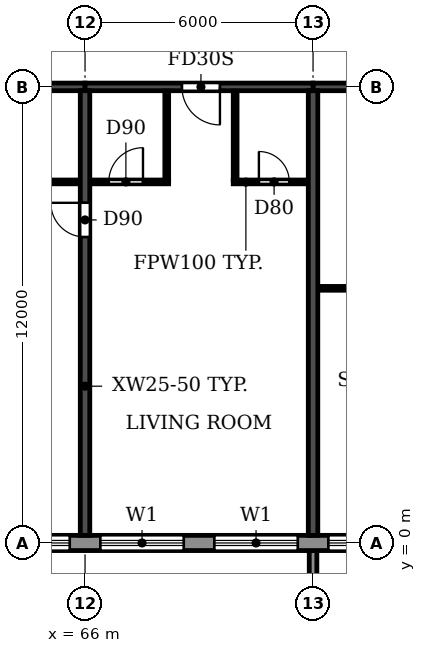
"""IFC4 building model, lengths in metres.
Left out: names, types, materials, properties, quantities, classifications, styles, units other than length and angle.
Written with IfcOpenShell. Run it as: python <this file> out.ifc"""

import sys

from ifc_helpers import new_model, si_unit, direction, frame, frame_2d, origin, place, context, subcontext, project, spatial, polyline, rectangle, outline, extrude, source, transform, mapped, element, fill, save


model = new_model("IFC4")
c1 = context("Model", 3, precision=1e-05, world=origin(), true_north=direction((0.0, 1.0)))
c2 = subcontext(c1, "Body", "Model", "MODEL_VIEW")
j1 = project(units=[si_unit("LENGTHUNIT", "METRE"), si_unit("PLANEANGLEUNIT", "RADIAN")], contexts=[c1])
p1 = place(None, origin())
s1 = spatial("IfcSite", under=j1, at=p1, CompositionType="ELEMENT")
p2 = place(p1, origin())
s2 = spatial("IfcBuilding", under=s1, at=p2, CompositionType="ELEMENT")
p3 = place(p2, frame((0.0, 0.0, 208.2)))
s3 = spatial("IfcBuildingStorey", under=s2, at=p3, CompositionType="ELEMENT", Elevation=208.2)
p4 = place(p3, frame((66.0, 0.2, 0.0), z_axis=(0.0, 0.0, 1.0), x_axis=(0.0, 1.0, 0.0)))
e1 = element("IfcWall", 1, at=p4, inside=s3, PredefinedType="SHEAR", context=c2, shape_type="SweptSolid", body=[
    extrude(rectangle(XDim=11.7, YDim=0.25, at=frame_2d((5.85, 0.0))), origin(), (0.0, 0.0, 1.0), 3.0),
])
p5 = place(p4, frame((7.85, 0.0, 0.0)))
e2 = element("IfcOpeningElement", 2, at=p5, cuts=e1, PredefinedType="OPENING", context=c2, shape_type="SweptSolid", body=[
    extrude(rectangle(XDim=0.9, YDim=2.1, at=frame_2d((0.45, 1.05))), frame((0.0, 0.135, 0.0), z_axis=(0.0, -1.0, 0.0), x_axis=(1.0, 0.0, 0.0)), (0.0, 0.0, 1.0), 0.27),
])
p6 = place(p3, frame((72.0, 0.2, 0.0), z_axis=(0.0, 0.0, 1.0), x_axis=(0.0, 1.0, 0.0)))
e3 = element("IfcWall", 3, at=p6, inside=s3, PredefinedType="SHEAR", context=c2, shape_type="SweptSolid", body=[
    extrude(rectangle(XDim=11.7, YDim=0.25, at=frame_2d((5.85, 0.0))), origin(), (0.0, 0.0, 1.0), 3.0),
])
p7 = place(p3, frame((60.0, 12.0, 0.0), z_axis=(0.0, 0.0, 1.0), x_axis=(1.0, 0.0, 0.0)))
e4 = element("IfcWall", 4, at=p7, inside=s3, PredefinedType="SHEAR", context=c2, shape_type="SweptSolid", body=[
    extrude(rectangle(XDim=6.0, YDim=0.2, at=frame_2d((3.0, 0.0))), origin(), (0.0, 0.0, 1.0), 2.4),
])
p8 = place(p3, frame((66.0, 12.0, 0.0), z_axis=(0.0, 0.0, 1.0), x_axis=(1.0, 0.0, 0.0)))
e5 = element("IfcWall", 5, at=p8, inside=s3, PredefinedType="SHEAR", context=c2, shape_type="SweptSolid", body=[
    extrude(rectangle(XDim=6.0, YDim=0.2, at=frame_2d((3.0, 0.0))), origin(), (0.0, 0.0, 1.0), 2.4),
])
p9 = place(p8, frame((2.55, 0.0, 0.0)))
e6 = element("IfcOpeningElement", 6, at=p9, cuts=e5, PredefinedType="OPENING", context=c2, shape_type="SweptSolid", body=[
    extrude(rectangle(XDim=1.0, YDim=2.1, at=frame_2d((0.5, 1.05))), frame((0.0, 0.11, 0.0), z_axis=(0.0, -1.0, 0.0), x_axis=(1.0, 0.0, 0.0)), (0.0, 0.0, 1.0), 0.22),
])
p10 = place(p3, frame((72.0, 12.0, 0.0), z_axis=(0.0, 0.0, 1.0), x_axis=(1.0, 0.0, 0.0)))
e7 = element("IfcWall", 7, at=p10, inside=s3, PredefinedType="SHEAR", context=c2, shape_type="SweptSolid", body=[
    extrude(rectangle(XDim=6.0, YDim=0.2, at=frame_2d((3.0, 0.0))), origin(), (0.0, 0.0, 1.0), 2.4),
])
p11 = place(p10, frame((2.55, 0.0, 0.0)))
e8 = element("IfcOpeningElement", 8, at=p11, cuts=e7, PredefinedType="OPENING", context=c2, shape_type="SweptSolid", body=[
    extrude(rectangle(XDim=1.0, YDim=2.1, at=frame_2d((0.5, 1.05))), frame((0.0, 0.11, 0.0), z_axis=(0.0, -1.0, 0.0), x_axis=(1.0, 0.0, 0.0)), (0.0, 0.0, 1.0), 0.22),
])
p12 = place(p3, frame((22.683, 0.0, 0.0), z_axis=(0.0, 0.0, 1.0), x_axis=(1.0, 0.0, 0.0)))
e9 = element("IfcWall", 9, at=p12, inside=s3, PredefinedType="STANDARD", context=c2, shape_type="SweptSolid", body=[
    extrude(rectangle(XDim=56.634, YDim=0.4, at=frame_2d((28.317, 0.0))), origin(), (0.0, 0.0, 1.0), 3.0),
])
p13 = place(p12, frame((1.917, 0.0, 0.0)))
e10 = element("IfcOpeningElement", 10, at=p13, cuts=e9, PredefinedType="OPENING", context=c2, shape_type="SweptSolid", body=[
    extrude(rectangle(XDim=1.8, YDim=2.4, at=frame_2d((0.9, 1.2))), frame((0.0, 0.21, 0.0), z_axis=(0.0, -1.0, 0.0), x_axis=(1.0, 0.0, 0.0)), (0.0, 0.0, 1.0), 0.42),
])
p14 = place(p12, frame((4.717, 0.0, 0.9)))
e11 = element("IfcOpeningElement", 11, at=p14, cuts=e9, PredefinedType="OPENING", context=c2, shape_type="SweptSolid", body=[
    extrude(rectangle(XDim=2.2, YDim=1.5, at=frame_2d((1.1, 0.75))), frame((0.0, 0.21, 0.0), z_axis=(0.0, -1.0, 0.0), x_axis=(1.0, 0.0, 0.0)), (0.0, 0.0, 1.0), 0.42),
])
p15 = place(p12, frame((7.717, 0.0, 0.9)))
e12 = element("IfcOpeningElement", 12, at=p15, cuts=e9, PredefinedType="OPENING", context=c2, shape_type="SweptSolid", body=[
    extrude(rectangle(XDim=2.2, YDim=1.5, at=frame_2d((1.1, 0.75))), frame((0.0, 0.21, 0.0), z_axis=(0.0, -1.0, 0.0), x_axis=(1.0, 0.0, 0.0)), (0.0, 0.0, 1.0), 0.42),
])
p16 = place(p12, frame((10.717, 0.0, 0.9)))
e13 = element("IfcOpeningElement", 13, at=p16, cuts=e9, PredefinedType="OPENING", context=c2, shape_type="SweptSolid", body=[
    extrude(rectangle(XDim=2.2, YDim=1.5, at=frame_2d((1.1, 0.75))), frame((0.0, 0.21, 0.0), z_axis=(0.0, -1.0, 0.0), x_axis=(1.0, 0.0, 0.0)), (0.0, 0.0, 1.0), 0.42),
])
p17 = place(p12, frame((13.917, 0.0, 0.0)))
e14 = element("IfcOpeningElement", 14, at=p17, cuts=e9, PredefinedType="OPENING", context=c2, shape_type="SweptSolid", body=[
    extrude(rectangle(XDim=1.8, YDim=2.4, at=frame_2d((0.9, 1.2))), frame((0.0, 0.21, 0.0), z_axis=(0.0, -1.0, 0.0), x_axis=(1.0, 0.0, 0.0)), (0.0, 0.0, 1.0), 0.42),
])
p18 = place(p12, frame((16.717, 0.0, 0.9)))
e15 = element("IfcOpeningElement", 15, at=p18, cuts=e9, PredefinedType="OPENING", context=c2, shape_type="SweptSolid", body=[
    extrude(rectangle(XDim=2.2, YDim=1.5, at=frame_2d((1.1, 0.75))), frame((0.0, 0.21, 0.0), z_axis=(0.0, -1.0, 0.0), x_axis=(1.0, 0.0, 0.0)), (0.0, 0.0, 1.0), 0.42),
])
p19 = place(p12, frame((19.717, 0.0, 0.9)))
e16 = element("IfcOpeningElement", 16, at=p19, cuts=e9, PredefinedType="OPENING", context=c2, shape_type="SweptSolid", body=[
    extrude(rectangle(XDim=2.2, YDim=1.5, at=frame_2d((1.1, 0.75))), frame((0.0, 0.21, 0.0), z_axis=(0.0, -1.0, 0.0), x_axis=(1.0, 0.0, 0.0)), (0.0, 0.0, 1.0), 0.42),
])
p20 = place(p12, frame((22.717, 0.0, 0.9)))
e17 = element("IfcOpeningElement", 17, at=p20, cuts=e9, PredefinedType="OPENING", context=c2, shape_type="SweptSolid", body=[
    extrude(rectangle(XDim=2.2, YDim=1.5, at=frame_2d((1.1, 0.75))), frame((0.0, 0.21, 0.0), z_axis=(0.0, -1.0, 0.0), x_axis=(1.0, 0.0, 0.0)), (0.0, 0.0, 1.0), 0.42),
])
p21 = place(p12, frame((25.917, 0.0, 0.0)))
e18 = element("IfcOpeningElement", 18, at=p21, cuts=e9, PredefinedType="OPENING", context=c2, shape_type="SweptSolid", body=[
    extrude(rectangle(XDim=1.8, YDim=2.4, at=frame_2d((0.9, 1.2))), frame((0.0, 0.21, 0.0), z_axis=(0.0, -1.0, 0.0), x_axis=(1.0, 0.0, 0.0)), (0.0, 0.0, 1.0), 0.42),
])
p22 = place(p12, frame((28.717, 0.0, 0.9)))
e19 = element("IfcOpeningElement", 19, at=p22, cuts=e9, PredefinedType="OPENING", context=c2, shape_type="SweptSolid", body=[
    extrude(rectangle(XDim=2.2, YDim=1.5, at=frame_2d((1.1, 0.75))), frame((0.0, 0.21, 0.0), z_axis=(0.0, -1.0, 0.0), x_axis=(1.0, 0.0, 0.0)), (0.0, 0.0, 1.0), 0.42),
])
p23 = place(p12, frame((31.717, 0.0, 0.9)))
e20 = element("IfcOpeningElement", 20, at=p23, cuts=e9, PredefinedType="OPENING", context=c2, shape_type="SweptSolid", body=[
    extrude(rectangle(XDim=2.2, YDim=1.5, at=frame_2d((1.1, 0.75))), frame((0.0, 0.21, 0.0), z_axis=(0.0, -1.0, 0.0), x_axis=(1.0, 0.0, 0.0)), (0.0, 0.0, 1.0), 0.42),
])
p24 = place(p12, frame((34.717, 0.0, 0.9)))
e21 = element("IfcOpeningElement", 21, at=p24, cuts=e9, PredefinedType="OPENING", context=c2, shape_type="SweptSolid", body=[
    extrude(rectangle(XDim=2.2, YDim=1.5, at=frame_2d((1.1, 0.75))), frame((0.0, 0.21, 0.0), z_axis=(0.0, -1.0, 0.0), x_axis=(1.0, 0.0, 0.0)), (0.0, 0.0, 1.0), 0.42),
])
p25 = place(p12, frame((37.717, 0.0, 0.9)))
e22 = element("IfcOpeningElement", 22, at=p25, cuts=e9, PredefinedType="OPENING", context=c2, shape_type="SweptSolid", body=[
    extrude(rectangle(XDim=2.2, YDim=1.5, at=frame_2d((1.1, 0.75))), frame((0.0, 0.21, 0.0), z_axis=(0.0, -1.0, 0.0), x_axis=(1.0, 0.0, 0.0)), (0.0, 0.0, 1.0), 0.42),
])
p26 = place(p12, frame((40.717, 0.0, 0.9)))
e23 = element("IfcOpeningElement", 23, at=p26, cuts=e9, PredefinedType="OPENING", context=c2, shape_type="SweptSolid", body=[
    extrude(rectangle(XDim=2.2, YDim=1.5, at=frame_2d((1.1, 0.75))), frame((0.0, 0.21, 0.0), z_axis=(0.0, -1.0, 0.0), x_axis=(1.0, 0.0, 0.0)), (0.0, 0.0, 1.0), 0.42),
])
p27 = place(p12, frame((43.717, 0.0, 0.9)))
e24 = element("IfcOpeningElement", 24, at=p27, cuts=e9, PredefinedType="OPENING", context=c2, shape_type="SweptSolid", body=[
    extrude(rectangle(XDim=2.2, YDim=1.5, at=frame_2d((1.1, 0.75))), frame((0.0, 0.21, 0.0), z_axis=(0.0, -1.0, 0.0), x_axis=(1.0, 0.0, 0.0)), (0.0, 0.0, 1.0), 0.42),
])
p28 = place(p12, frame((46.717, 0.0, 0.9)))
e25 = element("IfcOpeningElement", 25, at=p28, cuts=e9, PredefinedType="OPENING", context=c2, shape_type="SweptSolid", body=[
    extrude(rectangle(XDim=2.2, YDim=1.5, at=frame_2d((1.1, 0.75))), frame((0.0, 0.21, 0.0), z_axis=(0.0, -1.0, 0.0), x_axis=(1.0, 0.0, 0.0)), (0.0, 0.0, 1.0), 0.42),
])
p29 = place(p12, frame((49.717, 0.0, 0.9)))
e26 = element("IfcOpeningElement", 26, at=p29, cuts=e9, PredefinedType="OPENING", context=c2, shape_type="SweptSolid", body=[
    extrude(rectangle(XDim=2.2, YDim=1.5, at=frame_2d((1.1, 0.75))), frame((0.0, 0.21, 0.0), z_axis=(0.0, -1.0, 0.0), x_axis=(1.0, 0.0, 0.0)), (0.0, 0.0, 1.0), 0.42),
])
p30 = place(p12, frame((52.917, 0.0, 0.0)))
e27 = element("IfcOpeningElement", 27, at=p30, cuts=e9, PredefinedType="OPENING", context=c2, shape_type="SweptSolid", body=[
    extrude(rectangle(XDim=1.8, YDim=2.4, at=frame_2d((0.9, 1.2))), frame((0.0, 0.21, 0.0), z_axis=(0.0, -1.0, 0.0), x_axis=(1.0, 0.0, 0.0)), (0.0, 0.0, 1.0), 0.42),
])
m1 = source(origin(), c2, "Body", "SweptSolid", [
    extrude(outline(polyline([(0.0, 0.0), (0.2, 0.0), (0.2, 1.65), (0.0, 1.65), (0.0, 0.0)])), origin(), (0.0, 0.0, 1.0), 3.1),
])
p31 = place(p3, frame((71.9, -1.85, 0.0)))
e28 = element("IfcWall", 28, at=p31, inside=s3, PredefinedType="STANDARD", context=c2, shape_type="MappedRepresentation", body=[
    mapped(m1, transform((0.0, 0.0, 0.0))),
])
p32 = place(p3, frame((72.135, 6.7, 0.0), z_axis=(0.0, 0.0, 1.0), x_axis=(1.0, 0.0, 0.0)))
e29 = element("IfcWall", 29, at=p32, inside=s3, PredefinedType="PARTITIONING", context=c2, shape_type="SweptSolid", body=[
    extrude(rectangle(XDim=2.065, YDim=0.1, at=frame_2d((1.032, 0.0))), origin(), (0.0, 0.0, 1.0), 3.0),
])
p33 = place(p3, frame((63.1, 9.5, 0.0), z_axis=(0.0, 0.0, 1.0), x_axis=(1.0, 0.0, 0.0)))
e30 = element("IfcWall", 30, at=p33, inside=s3, PredefinedType="PARTITIONING", context=c2, shape_type="SweptSolid", body=[
    extrude(rectangle(XDim=2.765, YDim=0.1, at=frame_2d((1.382, 0.0))), origin(), (0.0, 0.0, 1.0), 3.0),
])
p34 = place(p33, frame((1.0, 0.0, 0.0)))
e31 = element("IfcOpeningElement", 31, at=p34, cuts=e30, PredefinedType="OPENING", context=c2, shape_type="SweptSolid", body=[
    extrude(rectangle(XDim=0.8, YDim=2.1, at=frame_2d((0.4, 1.05))), frame((0.0, 0.06, 0.0), z_axis=(0.0, -1.0, 0.0), x_axis=(1.0, 0.0, 0.0)), (0.0, 0.0, 1.0), 0.12),
])
p35 = place(p3, frame((66.135, 9.5, 0.0), z_axis=(0.0, 0.0, 1.0), x_axis=(1.0, 0.0, 0.0)))
e32 = element("IfcWall", 32, at=p35, inside=s3, PredefinedType="PARTITIONING", context=c2, shape_type="SweptSolid", body=[
    extrude(rectangle(XDim=2.065, YDim=0.1, at=frame_2d((1.032, 0.0))), origin(), (0.0, 0.0, 1.0), 3.0),
])
p36 = place(p35, frame((0.49, 0.0, 0.0)))
e33 = element("IfcOpeningElement", 33, at=p36, cuts=e32, PredefinedType="OPENING", context=c2, shape_type="SweptSolid", body=[
    extrude(rectangle(XDim=0.9, YDim=2.1, at=frame_2d((0.45, 1.05))), frame((0.0, 0.06, 0.0), z_axis=(0.0, -1.0, 0.0), x_axis=(1.0, 0.0, 0.0)), (0.0, 0.0, 1.0), 0.12),
])
p37 = place(p3, frame((69.9, 9.5, 0.0), z_axis=(0.0, 0.0, 1.0), x_axis=(1.0, 0.0, 0.0)))
e34 = element("IfcWall", 34, at=p37, inside=s3, PredefinedType="PARTITIONING", context=c2, shape_type="SweptSolid", body=[
    extrude(rectangle(XDim=1.965, YDim=0.1, at=frame_2d((0.982, 0.0))), origin(), (0.0, 0.0, 1.0), 3.0),
])
p38 = place(p37, frame((0.675, 0.0, 0.0)))
e35 = element("IfcOpeningElement", 35, at=p38, cuts=e34, PredefinedType="OPENING", context=c2, shape_type="SweptSolid", body=[
    extrude(rectangle(XDim=0.8, YDim=2.1, at=frame_2d((0.4, 1.05))), frame((0.0, 0.06, 0.0), z_axis=(0.0, -1.0, 0.0), x_axis=(1.0, 0.0, 0.0)), (0.0, 0.0, 1.0), 0.12),
])
for number, where, z_axis, x_axis in (
    (36, (68.15, 9.55, 0.0), (0.0, 0.0, 1.0), (0.0, 1.0, 0.0)),
    (37, (69.95, 9.55, 0.0), (0.0, 0.0, 1.0), (0.0, 1.0, 0.0)),
):
    element("IfcWall", number, at=place(p3, frame(where, z_axis=z_axis, x_axis=x_axis)), inside=s3, PredefinedType="PARTITIONING", context=c2, shape_type="SweptSolid", body=[
        extrude(rectangle(XDim=2.34, YDim=0.1, at=frame_2d((1.17, 0.0))), origin(), (0.0, 0.0, 1.0), 3.0),
    ])
p39 = place(p26, origin())
e38 = element("IfcWindow", 38, at=p39, inside=s3, PartitioningType="DOUBLE_PANEL_HORIZONTAL", PredefinedType="WINDOW", context=c2, shape_type="SweptSolid", body=[
    extrude(rectangle(XDim=2.2, YDim=1.5, at=frame_2d((1.1, 0.75))), frame((0.0, 0.03, 0.0), z_axis=(0.0, -1.0, 0.0), x_axis=(1.0, 0.0, 0.0)), (0.0, 0.0, 1.0), 0.06),
])
fill(e23, e38)
p40 = place(p27, origin())
e39 = element("IfcWindow", 39, at=p40, inside=s3, PartitioningType="DOUBLE_PANEL_HORIZONTAL", PredefinedType="WINDOW", context=c2, shape_type="SweptSolid", body=[
    extrude(rectangle(XDim=2.2, YDim=1.5, at=frame_2d((1.1, 0.75))), frame((0.0, 0.03, 0.0), z_axis=(0.0, -1.0, 0.0), x_axis=(1.0, 0.0, 0.0)), (0.0, 0.0, 1.0), 0.06),
])
fill(e24, e39)
p41 = place(p28, origin())
e40 = element("IfcWindow", 40, at=p41, inside=s3, PartitioningType="DOUBLE_PANEL_HORIZONTAL", PredefinedType="WINDOW", context=c2, shape_type="SweptSolid", body=[
    extrude(rectangle(XDim=2.2, YDim=1.5, at=frame_2d((1.1, 0.75))), frame((0.0, 0.03, 0.0), z_axis=(0.0, -1.0, 0.0), x_axis=(1.0, 0.0, 0.0)), (0.0, 0.0, 1.0), 0.06),
])
fill(e25, e40)
p42 = place(p29, origin())
e41 = element("IfcWindow", 41, at=p42, inside=s3, PartitioningType="DOUBLE_PANEL_HORIZONTAL", PredefinedType="WINDOW", context=c2, shape_type="SweptSolid", body=[
    extrude(rectangle(XDim=2.2, YDim=1.5, at=frame_2d((1.1, 0.75))), frame((0.0, 0.03, 0.0), z_axis=(0.0, -1.0, 0.0), x_axis=(1.0, 0.0, 0.0)), (0.0, 0.0, 1.0), 0.06),
])
fill(e26, e41)
p43 = place(p5, origin())
e42 = element("IfcDoor", 42, at=p43, inside=s3, OperationType="SINGLE_SWING_RIGHT", PredefinedType="DOOR", context=c2, shape_type="SweptSolid", body=[
    extrude(rectangle(XDim=0.9, YDim=2.1, at=frame_2d((0.45, 1.05))), frame((0.0, 0.025, 0.0), z_axis=(0.0, -1.0, 0.0), x_axis=(1.0, 0.0, 0.0)), (0.0, 0.0, 1.0), 0.05),
])
fill(e2, e42)
p44 = place(p36, origin())
e43 = element("IfcDoor", 43, at=p44, inside=s3, OperationType="SINGLE_SWING_RIGHT", PredefinedType="DOOR", context=c2, shape_type="SweptSolid", body=[
    extrude(rectangle(XDim=0.9, YDim=2.1, at=frame_2d((0.45, 1.05))), frame((0.0, 0.025, 0.0), z_axis=(0.0, -1.0, 0.0), x_axis=(1.0, 0.0, 0.0)), (0.0, 0.0, 1.0), 0.05),
])
fill(e33, e43)
p45 = place(p9, frame((1.0, 0.0, 0.0), z_axis=(0.0, 0.0, 1.0), x_axis=(-1.0, 0.0, 0.0)))
e44 = element("IfcDoor", 44, at=p45, inside=s3, OperationType="SINGLE_SWING_LEFT", PredefinedType="DOOR", context=c2, shape_type="SweptSolid", body=[
    extrude(rectangle(XDim=1.0, YDim=2.1, at=frame_2d((0.5, 1.05))), frame((0.0, 0.025, 0.0), z_axis=(0.0, -1.0, 0.0), x_axis=(1.0, 0.0, 0.0)), (0.0, 0.0, 1.0), 0.05),
])
fill(e6, e44)
p46 = place(p38, origin())
e45 = element("IfcDoor", 45, at=p46, inside=s3, OperationType="SINGLE_SWING_LEFT", PredefinedType="DOOR", context=c2, shape_type="SweptSolid", body=[
    extrude(rectangle(XDim=0.8, YDim=2.1, at=frame_2d((0.4, 1.05))), frame((0.0, 0.025, 0.0), z_axis=(0.0, -1.0, 0.0), x_axis=(1.0, 0.0, 0.0)), (0.0, 0.0, 1.0), 0.05),
])
fill(e35, e45)
save(model, sys.argv[1])
